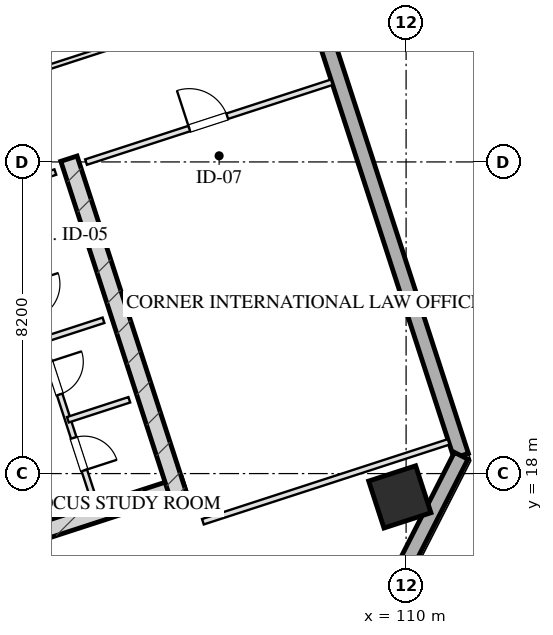
"""IFC4 building model, lengths in metres.
Left out: names, types, materials, properties, quantities, classifications, styles, units other than length and angle.
Written with IfcOpenShell. Run it as: python <this file> out.ifc"""

import sys

from ifc_helpers import new_model, si_unit, direction, frame, frame_2d, origin, origin_2d, place, context, subcontext, project, spatial, rectangle, hollow_rectangle, extrude, element, fill, save


model = new_model("IFC4")
c1 = context("Model", 3, precision=1e-05, world=origin(), true_north=direction((0.0, 1.0)))
c2 = subcontext(c1, "Body", "Model", "MODEL_VIEW")
j1 = project(units=[si_unit("LENGTHUNIT", "METRE"), si_unit("PLANEANGLEUNIT", "RADIAN")], contexts=[c1])
p1 = place(None, origin())
s1 = spatial("IfcSite", under=j1, at=p1, CompositionType="ELEMENT")
p2 = place(p1, origin())
s2 = spatial("IfcBuilding", under=s1, at=p2, CompositionType="ELEMENT")
p3 = place(p2, frame((0.0, 0.0, 192.05)))
s3 = spatial("IfcBuildingStorey", under=s2, at=p3, CompositionType="ELEMENT", Elevation=192.05)
p4 = place(p3, frame((88.701, 12.675, 0.0), z_axis=(0.0, 0.0, 1.0), x_axis=(0.95105824505, 0.309011673763, 0.0)))
e1 = element("IfcWall", 1, at=p4, inside=s3, PredefinedType="SHEAR", context=c2, shape_type="SweptSolid", body=[
    extrude(rectangle(XDim=16.25, YDim=0.45, at=frame_2d((8.125, 0.0))), origin(), (0.0, 0.0, 1.0), 3.45),
])
p5 = place(p3, frame((101.128, 26.286, 0.0), z_axis=(0.0, 0.0, 1.0), x_axis=(0.309004419953, -0.951060601881, 0.0)))
e2 = element("IfcWall", 2, at=p5, inside=s3, PredefinedType="SHEAR", context=c2, shape_type="SweptSolid", body=[
    extrude(rectangle(XDim=9.33, YDim=0.45, at=frame_2d((4.665, 0.0))), origin(), (0.0, 0.0, 1.0), 3.45),
])
p6 = place(p3, frame((109.835, 17.386, 0.0), z_axis=(0.0, 0.0, 1.0), x_axis=(0.951056516295, 0.309016994375, 0.0)))
e3 = element("IfcColumn", 3, at=p6, inside=s3, PredefinedType="COLUMN", context=c2, shape_type="SweptSolid", body=[
    extrude(hollow_rectangle(XDim=1.3, YDim=1.3, WallThickness=0.045, at=origin_2d()), origin(), (0.0, 0.0, 1.0), 3.451),
])
p7 = place(p3, frame((98.224, 59.173, 0.0), z_axis=(0.0, 0.0, 1.0), x_axis=(0.309014228706, -0.951057414911, 0.0)))
e4 = element("IfcWall", 4, at=p7, inside=s3, PredefinedType="SOLIDWALL", context=c2, shape_type="SweptSolid", body=[
    extrude(rectangle(XDim=42.8, YDim=0.4, at=frame_2d((21.4, 0.0))), origin(), (0.0, 0.0, 1.0), 2.61),
])
p8 = place(p7, frame((26.75, 0.0, 0.75)))
e5 = element("IfcOpeningElement", 5, at=p8, cuts=e4, PredefinedType="OPENING", context=c2, shape_type="SweptSolid", body=[
    extrude(rectangle(XDim=2.1, YDim=1.46, at=frame_2d((1.05, 0.73))), frame((0.0, 0.21, 0.0), z_axis=(0.0, -1.0, 0.0), x_axis=(1.0, 0.0, 0.0)), (0.0, 0.0, 1.0), 0.42),
])
p9 = place(p7, frame((22.95, 0.0, 0.75)))
e6 = element("IfcOpeningElement", 6, at=p9, cuts=e4, PredefinedType="OPENING", context=c2, shape_type="SweptSolid", body=[
    extrude(rectangle(XDim=2.1, YDim=1.46, at=frame_2d((1.05, 0.73))), frame((0.0, 0.21, 0.0), z_axis=(0.0, -1.0, 0.0), x_axis=(1.0, 0.0, 0.0)), (0.0, 0.0, 1.0), 0.42),
])
p10 = place(p7, frame((17.75, 0.0, 0.75)))
e7 = element("IfcOpeningElement", 7, at=p10, cuts=e4, PredefinedType="OPENING", context=c2, shape_type="SweptSolid", body=[
    extrude(rectangle(XDim=2.1, YDim=1.46, at=frame_2d((1.05, 0.73))), frame((0.0, 0.21, 0.0), z_axis=(0.0, -1.0, 0.0), x_axis=(1.0, 0.0, 0.0)), (0.0, 0.0, 1.0), 0.42),
])
p11 = place(p7, frame((13.95, 0.0, 0.75)))
e8 = element("IfcOpeningElement", 8, at=p11, cuts=e4, PredefinedType="OPENING", context=c2, shape_type="SweptSolid", body=[
    extrude(rectangle(XDim=2.1, YDim=1.46, at=frame_2d((1.05, 0.73))), frame((0.0, 0.21, 0.0), z_axis=(0.0, -1.0, 0.0), x_axis=(1.0, 0.0, 0.0)), (0.0, 0.0, 1.0), 0.42),
])
p12 = place(p3, frame((111.449, 18.468, 0.0), z_axis=(0.0, 0.0, 1.0), x_axis=(-0.454019523198, -0.890991735402, 0.0)))
e9 = element("IfcWall", 9, at=p12, inside=s3, PredefinedType="SOLIDWALL", context=c2, shape_type="SweptSolid", body=[
    extrude(rectangle(XDim=3.394, YDim=0.4, at=frame_2d((1.697, 0.0))), origin(), (0.0, 0.0, 1.0), 2.61),
])
p13 = place(p3, frame((97.727, 24.944, 0.0), z_axis=(0.0, 0.0, 1.0), x_axis=(0.951036872128, 0.309077446369, 0.0)))
e10 = element("IfcWall", 10, at=p13, inside=s3, PredefinedType="PARTITIONING", context=c2, shape_type="SweptSolid", body=[
    extrude(rectangle(XDim=3.2, YDim=0.15, at=frame_2d((1.6, 0.0))), origin(), (0.0, 0.0, 1.0), 3.175),
])
p14 = place(p13, frame((0.22, 0.0, 0.0)))
e11 = element("IfcOpeningElement", 11, at=p14, cuts=e10, PredefinedType="OPENING", context=c2, shape_type="SweptSolid", body=[
    extrude(rectangle(XDim=0.95, YDim=2.05, at=frame_2d((0.475, 1.025))), frame((0.0, 0.085, 0.0), z_axis=(0.0, -1.0, 0.0), x_axis=(1.0, 0.0, 0.0)), (0.0, 0.0, 1.0), 0.17),
])
p15 = place(p3, frame((99.153, 25.408, 0.0), z_axis=(0.0, 0.0, 1.0), x_axis=(0.309016001439, -0.951056838919, 0.0)))
e12 = element("IfcWall", 12, at=p15, inside=s3, PredefinedType="PARTITIONING", context=c2, shape_type="SweptSolid", body=[
    extrude(rectangle(XDim=8.43, YDim=0.15, at=frame_2d((4.215, 0.0))), origin(), (0.0, 0.0, 1.0), 3.175),
])
p16 = place(p15, frame((2.55, 0.0, 0.0)))
e13 = element("IfcOpeningElement", 13, at=p16, cuts=e12, PredefinedType="OPENING", context=c2, shape_type="SweptSolid", body=[
    extrude(rectangle(XDim=0.95, YDim=2.05, at=frame_2d((0.475, 1.025))), frame((0.0, 0.085, 0.0), z_axis=(0.0, -1.0, 0.0), x_axis=(1.0, 0.0, 0.0)), (0.0, 0.0, 1.0), 0.17),
])
p17 = place(p15, frame((4.7, 0.0, 0.0)))
e14 = element("IfcOpeningElement", 14, at=p17, cuts=e12, PredefinedType="OPENING", context=c2, shape_type="SweptSolid", body=[
    extrude(rectangle(XDim=0.9, YDim=2.05, at=frame_2d((0.45, 1.025))), frame((0.0, 0.085, 0.0), z_axis=(0.0, -1.0, 0.0), x_axis=(1.0, 0.0, 0.0)), (0.0, 0.0, 1.0), 0.17),
])
p18 = place(p15, frame((6.8, 0.0, 0.0)))
e15 = element("IfcOpeningElement", 15, at=p18, cuts=e12, PredefinedType="OPENING", context=c2, shape_type="SweptSolid", body=[
    extrude(rectangle(XDim=0.9, YDim=2.05, at=frame_2d((0.45, 1.025))), frame((0.0, 0.085, 0.0), z_axis=(0.0, -1.0, 0.0), x_axis=(1.0, 0.0, 0.0)), (0.0, 0.0, 1.0), 0.17),
])
p19 = place(p3, frame((100.42, 21.509, 0.0), z_axis=(0.0, 0.0, 1.0), x_axis=(0.951040401051, 0.309066587596, 0.0)))
e16 = element("IfcWall", 16, at=p19, inside=s3, PredefinedType="PARTITIONING", context=c2, shape_type="SweptSolid", body=[
    extrude(rectangle(XDim=1.7, YDim=0.15, at=frame_2d((0.85, 0.0))), origin(), (0.0, 0.0, 1.0), 3.175),
])
p20 = place(p3, frame((101.1, 19.416, 0.0), z_axis=(0.0, 0.0, 1.0), x_axis=(0.951054116971, 0.309024378638, 0.0)))
e17 = element("IfcWall", 17, at=p20, inside=s3, PredefinedType="PARTITIONING", context=c2, shape_type="SweptSolid", body=[
    extrude(rectangle(XDim=1.7, YDim=0.15, at=frame_2d((0.85, 0.0))), origin(), (0.0, 0.0, 1.0), 3.175),
])
p21 = place(p3, frame((104.653, 16.733, 0.0), z_axis=(0.0, 0.0, 1.0), x_axis=(0.951054383043, 0.309023559774, 0.0)))
e18 = element("IfcWall", 18, at=p21, inside=s3, PredefinedType="PARTITIONING", context=c2, shape_type="SweptSolid", body=[
    extrude(rectangle(XDim=6.8, YDim=0.15, at=frame_2d((3.4, 0.0))), origin(), (0.0, 0.0, 1.0), 3.175),
])
p22 = place(p3, frame((101.578, 26.196, 0.0), z_axis=(0.0, 0.0, 1.0), x_axis=(0.951064934653, 0.308991084134, 0.0)))
e19 = element("IfcWall", 19, at=p22, inside=s3, PredefinedType="PARTITIONING", context=c2, shape_type="SweptSolid", body=[
    extrude(rectangle(XDim=6.8, YDim=0.15, at=frame_2d((3.4, 0.0))), origin(), (0.0, 0.0, 1.0), 3.175),
])
p23 = place(p22, frame((2.856, 0.0, 0.0)))
e20 = element("IfcOpeningElement", 20, at=p23, cuts=e19, PredefinedType="OPENING", context=c2, shape_type="SweptSolid", body=[
    extrude(rectangle(XDim=1.05, YDim=2.05, at=frame_2d((0.525, 1.025))), frame((0.0, 0.085, 0.0), z_axis=(0.0, -1.0, 0.0), x_axis=(1.0, 0.0, 0.0)), (0.0, 0.0, 1.0), 0.17),
])
p24 = place(p3, frame((95.852, 27.153, 0.0), z_axis=(0.0, 0.0, 1.0), x_axis=(0.951054485045, 0.30902324585, 0.0)))
e21 = element("IfcWall", 21, at=p24, inside=s3, PredefinedType="PARTITIONING", context=c2, shape_type="SweptSolid", body=[
    extrude(rectangle(XDim=11.95, YDim=0.12, at=frame_2d((5.975, 0.0))), origin(), (0.0, 0.0, 1.0), 3.175),
])
p25 = place(p17, origin())
e22 = element("IfcDoor", 22, at=p25, inside=s3, OperationType="SINGLE_SWING_LEFT", PredefinedType="DOOR", context=c2, shape_type="SweptSolid", body=[
    extrude(rectangle(XDim=0.9, YDim=2.05, at=frame_2d((0.45, 1.025))), frame((0.0, 0.025, 0.0), z_axis=(0.0, -1.0, 0.0), x_axis=(1.0, 0.0, 0.0)), (0.0, 0.0, 1.0), 0.05),
])
fill(e14, e22)
p26 = place(p18, origin())
e23 = element("IfcDoor", 23, at=p26, inside=s3, OperationType="SINGLE_SWING_RIGHT", PredefinedType="DOOR", context=c2, shape_type="SweptSolid", body=[
    extrude(rectangle(XDim=0.9, YDim=2.05, at=frame_2d((0.45, 1.025))), frame((0.0, 0.025, 0.0), z_axis=(0.0, -1.0, 0.0), x_axis=(1.0, 0.0, 0.0)), (0.0, 0.0, 1.0), 0.05),
])
fill(e15, e23)
p27 = place(p23, origin())
e24 = element("IfcDoor", 24, at=p27, inside=s3, OperationType="SINGLE_SWING_LEFT", PredefinedType="DOOR", context=c2, shape_type="SweptSolid", body=[
    extrude(rectangle(XDim=1.05, YDim=2.05, at=frame_2d((0.525, 1.025))), frame((0.0, 0.025, 0.0), z_axis=(0.0, -1.0, 0.0), x_axis=(1.0, 0.0, 0.0)), (0.0, 0.0, 1.0), 0.05),
])
fill(e20, e24)
save(model, sys.argv[1])
